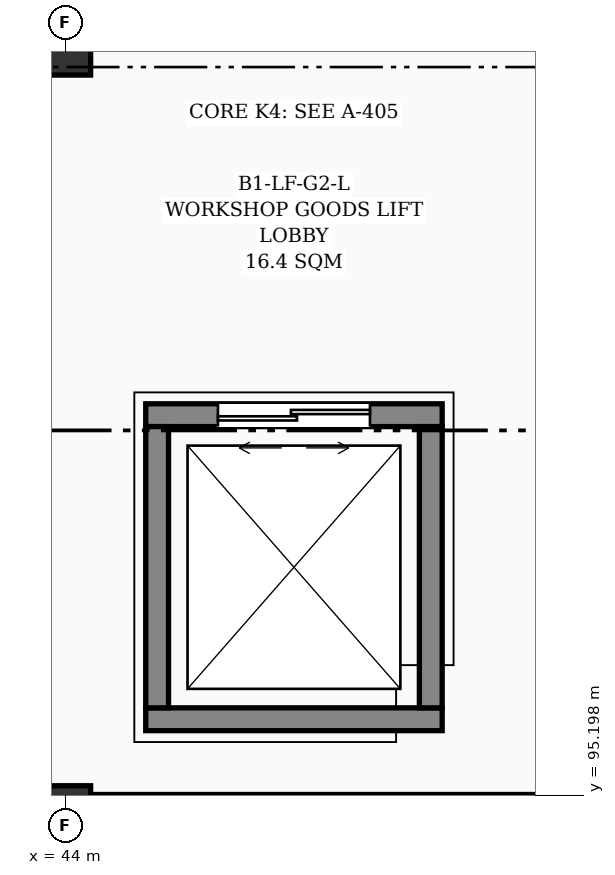
"""IFC4 building model, lengths in metres.
Left out: names, types, materials, properties, quantities, classifications, styles, units other than length and angle.
Written with IfcOpenShell. Run it as: python <this file> out.ifc"""

import sys

from ifc_helpers import new_model, si_unit, direction, frame, frame_2d, origin, origin_2d, place, context, subcontext, project, spatial, rectangle, extrude, element, fill, save


model = new_model("IFC4")
c1 = context("Model", 3, precision=1e-05, world=origin(), true_north=direction((0.0, 1.0)))
c2 = subcontext(c1, "Body", "Model", "MODEL_VIEW")
j1 = project(units=[si_unit("LENGTHUNIT", "METRE"), si_unit("PLANEANGLEUNIT", "RADIAN")], contexts=[c1])
p1 = place(None, origin())
s1 = spatial("IfcSite", under=j1, at=p1, CompositionType="ELEMENT")
p2 = place(p1, origin())
s2 = spatial("IfcBuilding", under=s1, at=p2, CompositionType="ELEMENT")
p3 = place(p2, frame((0.0, 0.0, -4.8)))
s3 = spatial("IfcBuildingStorey", under=s2, at=p3, CompositionType="ELEMENT", Elevation=-4.8)
for number, where, z_axis, x_axis in (
    (1, (44.0, 95.0, -0.38), (0.0, 0.0, 1.0), (1.0, 0.0, 0.0)),
    (2, (44.0, 105.0, -0.38), (0.0, 0.0, 1.0), (1.0, 0.0, 0.0)),
):
    element("IfcColumn", number, at=place(p3, frame(where, z_axis=z_axis, x_axis=x_axis)), inside=s3, PredefinedType="COLUMN", context=c2, shape_type="SweptSolid", body=[
        extrude(rectangle(XDim=0.65, YDim=0.65, at=origin_2d()), origin(), (0.0, 0.0, 1.0), 5.18),
    ])
p4 = place(p3, frame((45.05, 96.2, -1.2), z_axis=(0.0, 0.0, 1.0), x_axis=(1.0, 0.0, 0.0)))
e3 = element("IfcWall", 3, at=p4, inside=s3, PredefinedType="SHEAR", context=c2, shape_type="SweptSolid", body=[
    extrude(rectangle(XDim=3.9, YDim=0.3, at=frame_2d((1.95, 0.0))), origin(), (0.0, 0.0, 1.0), 5.66),
])
p5 = place(p3, frame((48.95, 100.2, -1.2), z_axis=(0.0, 0.0, 1.0), x_axis=(-1.0, 0.0, 0.0)))
e4 = element("IfcWall", 4, at=p5, inside=s3, PredefinedType="SHEAR", context=c2, shape_type="SweptSolid", body=[
    extrude(rectangle(XDim=3.9, YDim=0.3, at=frame_2d((1.95, 0.0))), origin(), (0.0, 0.0, 1.0), 5.66),
])
p6 = place(p5, frame((0.95, 0.0, 1.2)))
e5 = element("IfcOpeningElement", 5, at=p6, cuts=e4, PredefinedType="OPENING", context=c2, shape_type="SweptSolid", body=[
    extrude(rectangle(XDim=2.0, YDim=2.4, at=frame_2d((1.0, 1.2))), frame((0.0, 0.16, 0.0), z_axis=(0.0, -1.0, 0.0), x_axis=(1.0, 0.0, 0.0)), (0.0, 0.0, 1.0), 0.32),
])
for number, where, z_axis, x_axis in (
    (6, (45.2, 96.35, -1.2), (0.0, 0.0, 1.0), (0.0, 1.0, 0.0)),
    (7, (48.8, 100.05, -1.2), (0.0, 0.0, 1.0), (0.0, -1.0, 0.0)),
):
    element("IfcWall", number, at=place(p3, frame(where, z_axis=z_axis, x_axis=x_axis)), inside=s3, PredefinedType="SHEAR", context=c2, shape_type="SweptSolid", body=[
        extrude(rectangle(XDim=3.7, YDim=0.3, at=frame_2d((1.85, 0.0))), origin(), (0.0, 0.0, 1.0), 5.66),
    ])
p7 = place(p6, origin())
e8 = element("IfcDoor", 8, at=p7, inside=s3, OperationType="DOUBLE_DOOR_SLIDING", PredefinedType="DOOR", context=c2, shape_type="SweptSolid", body=[
    extrude(rectangle(XDim=2.0, YDim=2.4, at=frame_2d((1.0, 1.2))), frame((0.0, 0.025, 0.0), z_axis=(0.0, -1.0, 0.0), x_axis=(1.0, 0.0, 0.0)), (0.0, 0.0, 1.0), 0.05),
])
fill(e5, e8)
save(model, sys.argv[1])
